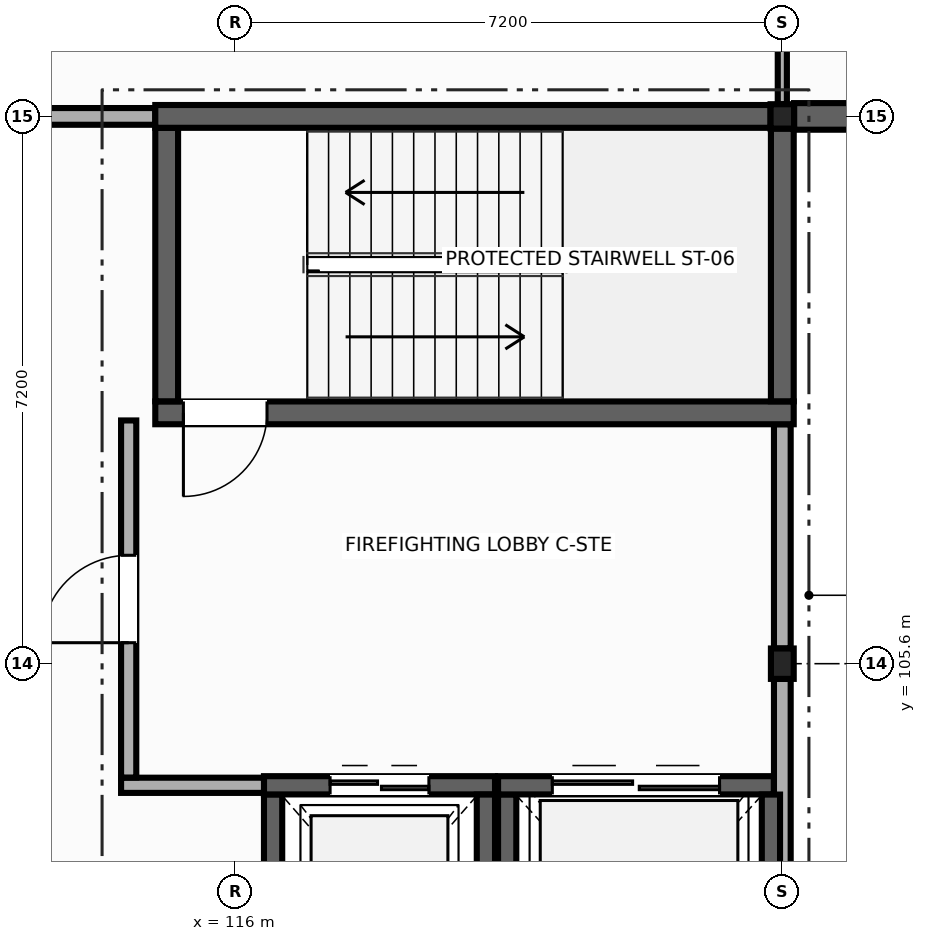
"""IFC4 building model, lengths in metres.
Left out: names, types, materials, properties, quantities, classifications, styles, units other than length and angle.
Written with IfcOpenShell. Run it as: python <this file> out.ifc"""

import sys

from ifc_helpers import new_model, si_unit, direction, frame, frame_2d, origin, origin_2d, place, context, subcontext, project, spatial, rectangle, i_section, extrude, element, fill, save


model = new_model("IFC4")
c1 = context("Model", 3, precision=1e-05, world=origin(), true_north=direction((0.0, 1.0)))
c2 = subcontext(c1, "Body", "Model", "MODEL_VIEW")
j1 = project(units=[si_unit("LENGTHUNIT", "METRE"), si_unit("PLANEANGLEUNIT", "RADIAN")], contexts=[c1])
p1 = place(None, origin())
s1 = spatial("IfcSite", under=j1, at=p1, CompositionType="ELEMENT")
p2 = place(p1, origin())
s2 = spatial("IfcBuilding", under=s1, at=p2, CompositionType="ELEMENT")
p3 = place(p2, frame((0.0, 0.0, 14.4)))
s3 = spatial("IfcBuildingStorey", under=s2, at=p3, CompositionType="ELEMENT", Elevation=14.4)
p4 = place(p3, frame((123.2, 105.6, 0.0), z_axis=(0.0, 0.0, 1.0), x_axis=(1.0, 0.0, 0.0)))
e1 = element("IfcColumn", 1, at=p4, inside=s3, PredefinedType="COLUMN", context=c2, shape_type="SweptSolid", body=[
    extrude(i_section(OverallWidth=0.3, OverallDepth=0.4, WebThickness=0.013, FlangeThickness=0.024, at=origin_2d()), origin(), (0.0, 0.0, 1.0), 4.5),
])
p5 = place(p3, frame((123.2, 112.8, 0.0), z_axis=(0.0, 0.0, 1.0), x_axis=(1.0, 0.0, 0.0)))
e2 = element("IfcColumn", 2, at=p5, inside=s3, PredefinedType="COLUMN", context=c2, shape_type="SweptSolid", body=[
    extrude(i_section(OverallWidth=0.309, OverallDepth=0.321, WebThickness=0.014, FlangeThickness=0.022, at=origin_2d()), origin(), (0.0, 0.0, 1.0), 4.5),
])
p6 = place(p3, frame((109.0, 112.8, 0.0), z_axis=(0.0, 0.0, 1.0), x_axis=(1.0, 0.0, 0.0)))
e3 = element("IfcWall", 3, at=p6, inside=s3, PredefinedType="SOLIDWALL", context=c2, shape_type="SweptSolid", body=[
    extrude(rectangle(XDim=5.95, YDim=0.22, at=frame_2d((2.975, 0.0))), origin(), (0.0, 0.0, 1.0), 4.22),
])
p7 = place(p6, frame((2.875, 0.0, 0.0)))
e4 = element("IfcOpeningElement", 4, at=p7, cuts=e3, PredefinedType="OPENING", context=c2, shape_type="SweptSolid", body=[
    extrude(rectangle(XDim=1.1, YDim=2.15, at=frame_2d((0.55, 1.075))), frame((0.0, 0.12, 0.0), z_axis=(0.0, -1.0, 0.0), x_axis=(1.0, 0.0, 0.0)), (0.0, 0.0, 1.0), 0.24),
])
p8 = place(p3, frame((123.2, 108.75, 0.0), z_axis=(0.0, 0.0, 1.0), x_axis=(0.0, -1.0, 0.0)))
e5 = element("IfcWall", 5, at=p8, inside=s3, PredefinedType="SOLIDWALL", context=c2, shape_type="SweptSolid", body=[
    extrude(rectangle(XDim=2.95, YDim=0.22, at=frame_2d((1.475, 0.0))), origin(), (0.0, 0.0, 1.0), 3.615),
])
p9 = place(p3, frame((123.2, 105.4, 0.0), z_axis=(0.0, 0.0, 1.0), x_axis=(0.0, -1.0, 0.0)))
e6 = element("IfcWall", 6, at=p9, inside=s3, PredefinedType="SOLIDWALL", context=c2, shape_type="SweptSolid", body=[
    extrude(rectangle(XDim=6.85, YDim=0.22, at=frame_2d((3.425, 0.0))), origin(), (0.0, 0.0, 1.0), 3.655),
])
p10 = place(p3, frame((130.1, 112.8, 0.0), z_axis=(0.0, 0.0, 1.0), x_axis=(-1.0, 0.0, 0.0)))
e7 = element("IfcWall", 7, at=p10, inside=s3, PredefinedType="SOLIDWALL", context=c2, shape_type="SweptSolid", body=[
    extrude(rectangle(XDim=6.746, YDim=0.35, at=frame_2d((3.373, 0.0))), origin(), (0.0, 0.0, 1.0), 4.22),
])
p11 = place(p10, frame((2.473, 0.0, 0.85)))
e8 = element("IfcOpeningElement", 8, at=p11, cuts=e7, PredefinedType="OPENING", context=c2, shape_type="SweptSolid", body=[
    extrude(rectangle(XDim=1.8, YDim=1.2, at=frame_2d((0.9, 0.6))), frame((0.0, 0.185, 0.0), z_axis=(0.0, -1.0, 0.0), x_axis=(1.0, 0.0, 0.0)), (0.0, 0.0, 1.0), 0.37),
])
p12 = place(p3, frame((123.35, 108.9, 0.0), z_axis=(0.0, 0.0, 1.0), x_axis=(-1.0, 0.0, 0.0)))
e9 = element("IfcWall", 9, at=p12, inside=s3, PredefinedType="SHEAR", context=c2, shape_type="SweptSolid", body=[
    extrude(rectangle(XDim=8.4, YDim=0.3, at=frame_2d((4.2, 0.0))), origin(), (0.0, 0.0, 1.0), 4.26),
])
p13 = place(p12, frame((6.93, 0.0, 0.0)))
e10 = element("IfcOpeningElement", 10, at=p13, cuts=e9, PredefinedType="OPENING", context=c2, shape_type="SweptSolid", body=[
    extrude(rectangle(XDim=1.1, YDim=2.15, at=frame_2d((0.55, 1.075))), frame((0.0, 0.16, 0.0), z_axis=(0.0, -1.0, 0.0), x_axis=(1.0, 0.0, 0.0)), (0.0, 0.0, 1.0), 0.32),
])
p14 = place(p3, frame((115.1, 109.052, 0.0), z_axis=(0.0, 0.0, 1.0), x_axis=(0.0, 1.0, 0.0)))
e11 = element("IfcWall", 11, at=p14, inside=s3, PredefinedType="SHEAR", context=c2, shape_type="SweptSolid", body=[
    extrude(rectangle(XDim=3.598, YDim=0.3, at=frame_2d((1.799, 0.0))), origin(), (0.0, 0.0, 1.0), 4.26),
])
p15 = place(p3, frame((114.95, 112.8, 0.0), z_axis=(0.0, 0.0, 1.0), x_axis=(1.0, 0.0, 0.0)))
e12 = element("IfcWall", 12, at=p15, inside=s3, PredefinedType="SHEAR", context=c2, shape_type="SweptSolid", body=[
    extrude(rectangle(XDim=8.095, YDim=0.3, at=frame_2d((4.048, 0.0))), origin(), (0.0, 0.0, 1.0), 4.22),
])
p16 = place(p3, frame((123.2, 112.64, 0.0), z_axis=(0.0, 0.0, 1.0), x_axis=(0.0, -1.0, 0.0)))
e13 = element("IfcWall", 13, at=p16, inside=s3, PredefinedType="SHEAR", context=c2, shape_type="SweptSolid", body=[
    extrude(rectangle(XDim=3.588, YDim=0.3, at=frame_2d((1.794, 0.0))), origin(), (0.0, 0.0, 1.0), 4.26),
])
p17 = place(p3, frame((116.5, 100.922, 0.0), z_axis=(0.0, 0.0, 1.0), x_axis=(0.0, 1.0, 0.0)))
e14 = element("IfcWall", 14, at=p17, inside=s3, PredefinedType="SHEAR", context=c2, shape_type="SweptSolid", body=[
    extrude(rectangle(XDim=2.958, YDim=0.24, at=frame_2d((1.479, 0.0))), origin(), (0.0, 0.0, 1.0), 4.26),
])
p18 = place(p3, frame((116.38, 104.0, 0.0), z_axis=(0.0, 0.0, 1.0), x_axis=(1.0, 0.0, 0.0)))
e15 = element("IfcWall", 15, at=p18, inside=s3, PredefinedType="SHEAR", context=c2, shape_type="SweptSolid", body=[
    extrude(rectangle(XDim=3.04, YDim=0.24, at=frame_2d((1.52, 0.0))), origin(), (0.0, 0.0, 1.0), 4.26),
])
p19 = place(p18, frame((0.87, 0.0, 0.0)))
e16 = element("IfcOpeningElement", 16, at=p19, cuts=e15, PredefinedType="OPENING", context=c2, shape_type="SweptSolid", body=[
    extrude(rectangle(XDim=1.3, YDim=2.15, at=frame_2d((0.65, 1.075))), frame((0.0, 0.13, 0.0), z_axis=(0.0, -1.0, 0.0), x_axis=(1.0, 0.0, 0.0)), (0.0, 0.0, 1.0), 0.26),
])
p20 = place(p3, frame((119.3, 103.878, 0.0), z_axis=(0.0, 0.0, 1.0), x_axis=(0.0, -1.0, 0.0)))
e17 = element("IfcWall", 17, at=p20, inside=s3, PredefinedType="SHEAR", context=c2, shape_type="SweptSolid", body=[
    extrude(rectangle(XDim=2.956, YDim=0.24, at=frame_2d((1.478, 0.0))), origin(), (0.0, 0.0, 1.0), 4.26),
])
p21 = place(p3, frame((119.58, 100.322, 0.0), z_axis=(0.0, 0.0, 1.0), x_axis=(0.0, 1.0, 0.0)))
e18 = element("IfcWall", 18, at=p21, inside=s3, PredefinedType="SHEAR", context=c2, shape_type="SweptSolid", body=[
    extrude(rectangle(XDim=3.558, YDim=0.24, at=frame_2d((1.779, 0.0))), origin(), (0.0, 0.0, 1.0), 4.26),
])
p22 = place(p3, frame((119.46, 104.0, 0.0), z_axis=(0.0, 0.0, 1.0), x_axis=(1.0, 0.0, 0.0)))
e19 = element("IfcWall", 19, at=p22, inside=s3, PredefinedType="SHEAR", context=c2, shape_type="SweptSolid", body=[
    extrude(rectangle(XDim=3.628, YDim=0.24, at=frame_2d((1.814, 0.0))), origin(), (0.0, 0.0, 1.0), 4.26),
])
p23 = place(p22, frame((0.714, 0.0, 0.0)))
e20 = element("IfcOpeningElement", 20, at=p23, cuts=e19, PredefinedType="OPENING", context=c2, shape_type="SweptSolid", body=[
    extrude(rectangle(XDim=2.2, YDim=2.5, at=frame_2d((1.1, 1.25))), frame((0.0, 0.13, 0.0), z_axis=(0.0, -1.0, 0.0), x_axis=(1.0, 0.0, 0.0)), (0.0, 0.0, 1.0), 0.26),
])
p24 = place(p3, frame((123.05, 103.878, 0.0), z_axis=(0.0, 0.0, 1.0), x_axis=(0.0, -1.0, 0.0)))
e21 = element("IfcWall", 21, at=p24, inside=s3, PredefinedType="SHEAR", context=c2, shape_type="SweptSolid", body=[
    extrude(rectangle(XDim=3.556, YDim=0.24, at=frame_2d((1.778, 0.0))), origin(), (0.0, 0.0, 1.0), 4.26),
])
p25 = place(p3, frame((116.38, 104.0, 0.0), z_axis=(0.0, 0.0, 1.0), x_axis=(-1.0, 0.0, 0.0)))
e22 = element("IfcWall", 22, at=p25, inside=s3, PredefinedType="PARTITIONING", context=c2, shape_type="SweptSolid", body=[
    extrude(rectangle(XDim=1.88, YDim=0.2, at=frame_2d((0.94, 0.0))), origin(), (0.0, 0.0, 1.0), 4.26),
])
p26 = place(p3, frame((114.6, 104.102, 0.0), z_axis=(0.0, 0.0, 1.0), x_axis=(0.0, 1.0, 0.0)))
e23 = element("IfcWall", 23, at=p26, inside=s3, PredefinedType="PARTITIONING", context=c2, shape_type="SweptSolid", body=[
    extrude(rectangle(XDim=4.698, YDim=0.2, at=frame_2d((2.349, 0.0))), origin(), (0.0, 0.0, 1.0), 2.255),
])
p27 = place(p26, frame((1.774, 0.0, 0.0)))
e24 = element("IfcOpeningElement", 24, at=p27, cuts=e23, PredefinedType="OPENING", context=c2, shape_type="SweptSolid", body=[
    extrude(rectangle(XDim=1.15, YDim=2.15, at=frame_2d((0.575, 1.075))), frame((0.0, 0.11, 0.0), z_axis=(0.0, -1.0, 0.0), x_axis=(1.0, 0.0, 0.0)), (0.0, 0.0, 1.0), 0.22),
])
p28 = place(p3, frame((123.2, 119.7, 0.0), z_axis=(0.0, 0.0, 1.0), x_axis=(0.0, -1.0, 0.0)))
e25 = element("IfcWall", 25, at=p28, inside=s3, PredefinedType="PARTITIONING", context=c2, shape_type="SweptSolid", body=[
    extrude(rectangle(XDim=6.74, YDim=0.12, at=frame_2d((3.37, 0.0))), origin(), (0.0, 0.0, 1.0), 3.515),
])
p29 = place(p13, origin())
e26 = element("IfcDoor", 26, at=p29, inside=s3, OperationType="SINGLE_SWING_RIGHT", PredefinedType="DOOR", context=c2, shape_type="SweptSolid", body=[
    extrude(rectangle(XDim=1.1, YDim=2.15, at=frame_2d((0.55, 1.075))), frame((0.0, 0.025, 0.0), z_axis=(0.0, -1.0, 0.0), x_axis=(1.0, 0.0, 0.0)), (0.0, 0.0, 1.0), 0.05),
])
fill(e10, e26)
p30 = place(p19, origin())
e27 = element("IfcDoor", 27, at=p30, inside=s3, OperationType="DOUBLE_DOOR_SLIDING", PredefinedType="DOOR", context=c2, shape_type="SweptSolid", body=[
    extrude(rectangle(XDim=1.3, YDim=2.15, at=frame_2d((0.65, 1.075))), frame((0.0, 0.025, 0.0), z_axis=(0.0, -1.0, 0.0), x_axis=(1.0, 0.0, 0.0)), (0.0, 0.0, 1.0), 0.05),
])
fill(e16, e27)
p31 = place(p23, origin())
e28 = element("IfcDoor", 28, at=p31, inside=s3, OperationType="DOUBLE_DOOR_SLIDING", PredefinedType="DOOR", context=c2, shape_type="SweptSolid", body=[
    extrude(rectangle(XDim=2.2, YDim=2.5, at=frame_2d((1.1, 1.25))), frame((0.0, 0.025, 0.0), z_axis=(0.0, -1.0, 0.0), x_axis=(1.0, 0.0, 0.0)), (0.0, 0.0, 1.0), 0.05),
])
fill(e20, e28)
p32 = place(p27, origin())
e29 = element("IfcDoor", 29, at=p32, inside=s3, OperationType="SINGLE_SWING_LEFT", PredefinedType="DOOR", context=c2, shape_type="SweptSolid", body=[
    extrude(rectangle(XDim=1.15, YDim=2.15, at=frame_2d((0.575, 1.075))), frame((0.0, 0.025, 0.0), z_axis=(0.0, -1.0, 0.0), x_axis=(1.0, 0.0, 0.0)), (0.0, 0.0, 1.0), 0.05),
])
fill(e24, e29)
save(model, sys.argv[1])
